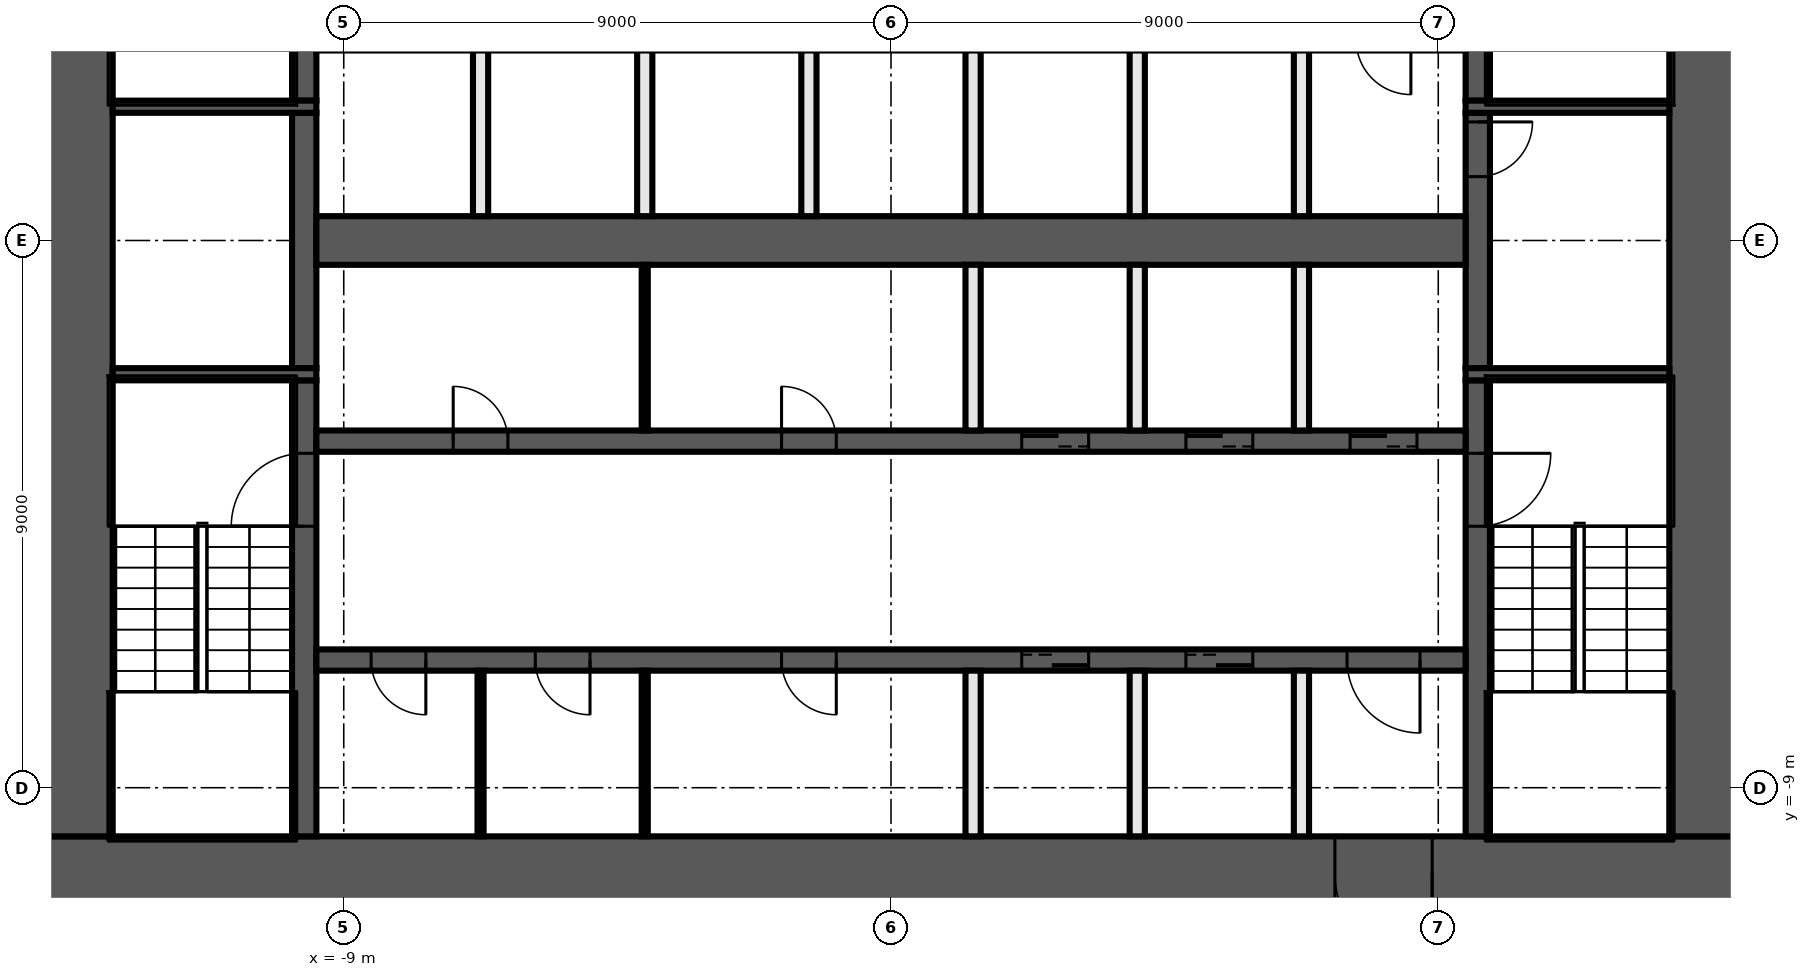
"""IFC4 building model, lengths in metres.
Left out: names, types, materials, properties, quantities, classifications, styles, units other than length and angle.
Written with IfcOpenShell. Run it as: python <this file> out.ifc"""

import sys

from ifc_helpers import new_model, si_unit, direction, frame, frame_2d, origin, place, context, subcontext, project, spatial, rectangle, extrude, element, fill, save


model = new_model("IFC4")
c1 = context("Model", 3, precision=1e-05, world=origin(), true_north=direction((0.0, 1.0)))
c2 = subcontext(c1, "Body", "Model", "MODEL_VIEW")
j1 = project(units=[si_unit("LENGTHUNIT", "METRE"), si_unit("PLANEANGLEUNIT", "RADIAN")], contexts=[c1])
p1 = place(None, origin())
s1 = spatial("IfcSite", under=j1, at=p1, CompositionType="ELEMENT")
p2 = place(p1, origin())
s2 = spatial("IfcBuilding", under=s1, at=p2, CompositionType="ELEMENT")
p3 = place(p2, frame((0.0, 0.0, -6.0)))
s3 = spatial("IfcBuildingStorey", under=s2, at=p3, CompositionType="ELEMENT", Elevation=-6.0)
p4 = place(p3, frame((14.0, -10.4, 0.0), z_axis=(0.0, 0.0, 1.0), x_axis=(-1.0, 0.0, 0.0)))
e1 = element("IfcWall", 1, at=p4, inside=s3, PredefinedType="SHEAR", context=c2, shape_type="SweptSolid", body=[
    extrude(rectangle(XDim=28.0, YDim=1.2, at=frame_2d((14.0, 0.0))), origin(), (0.0, 0.0, 1.0), 5.55),
])
p5 = place(p4, frame((5.1, 0.0, 0.0)))
e2 = element("IfcOpeningElement", 2, at=p5, cuts=e1, PredefinedType="OPENING", context=c2, shape_type="SweptSolid", body=[
    extrude(rectangle(XDim=1.6, YDim=2.1, at=frame_2d((0.8, 1.05))), frame((0.0, 0.61, 0.0), z_axis=(0.0, -1.0, 0.0), x_axis=(1.0, 0.0, 0.0)), (0.0, 0.0, 1.0), 1.22),
])
for number, where, z_axis, x_axis in (
    (3, (13.4, 9.8, 0.0), (0.0, 0.0, 1.0), (0.0, -1.0, 0.0)),
    (4, (-13.4, -9.8, 0.0), (0.0, 0.0, 1.0), (0.0, 1.0, 0.0)),
):
    element("IfcWall", number, at=place(p3, frame(where, z_axis=z_axis, x_axis=x_axis)), inside=s3, PredefinedType="SHEAR", context=c2, shape_type="SweptSolid", body=[
        extrude(rectangle(XDim=19.6, YDim=1.2, at=frame_2d((9.8, 0.0))), origin(), (0.0, 0.0, 1.0), 5.55),
    ])
p6 = place(p3, frame((9.65, -2.3, 0.0), z_axis=(0.0, 0.0, 1.0), x_axis=(0.0, -1.0, 0.0)))
e5 = element("IfcWall", 5, at=p6, inside=s3, PredefinedType="SHEAR", context=c2, shape_type="SweptSolid", body=[
    extrude(rectangle(XDim=7.5, YDim=0.4, at=frame_2d((3.75, 0.0))), origin(), (0.0, 0.0, 1.0), 5.55),
])
p7 = place(p6, frame((1.2, 0.0, 0.0)))
e6 = element("IfcOpeningElement", 6, at=p7, cuts=e5, PredefinedType="OPENING", context=c2, shape_type="SweptSolid", body=[
    extrude(rectangle(XDim=1.2, YDim=2.1, at=frame_2d((0.6, 1.05))), frame((0.0, 0.21, 0.0), z_axis=(0.0, -1.0, 0.0), x_axis=(1.0, 0.0, 0.0)), (0.0, 0.0, 1.0), 0.42),
])
p8 = place(p3, frame((9.65, 2.1, 0.0), z_axis=(0.0, 0.0, 1.0), x_axis=(0.0, -1.0, 0.0)))
e7 = element("IfcWall", 7, at=p8, inside=s3, PredefinedType="SHEAR", context=c2, shape_type="SweptSolid", body=[
    extrude(rectangle(XDim=4.2, YDim=0.4, at=frame_2d((2.1, 0.0))), origin(), (0.0, 0.0, 1.0), 5.55),
])
p9 = place(p8, frame((0.15, 0.0, 0.0)))
e8 = element("IfcOpeningElement", 8, at=p9, cuts=e7, PredefinedType="OPENING", context=c2, shape_type="SweptSolid", body=[
    extrude(rectangle(XDim=0.9, YDim=2.1, at=frame_2d((0.45, 1.05))), frame((0.0, 0.21, 0.0), z_axis=(0.0, -1.0, 0.0), x_axis=(1.0, 0.0, 0.0)), (0.0, 0.0, 1.0), 0.42),
])
p10 = place(p3, frame((9.65, 9.8, 0.0), z_axis=(0.0, 0.0, 1.0), x_axis=(0.0, -1.0, 0.0)))
e9 = element("IfcWall", 9, at=p10, inside=s3, PredefinedType="SHEAR", context=c2, shape_type="SweptSolid", body=[
    extrude(rectangle(XDim=7.5, YDim=0.4, at=frame_2d((3.75, 0.0))), origin(), (0.0, 0.0, 1.0), 5.55),
])
p11 = place(p10, frame((5.1, 0.0, 0.0)))
e10 = element("IfcOpeningElement", 10, at=p11, cuts=e9, PredefinedType="OPENING", context=c2, shape_type="SweptSolid", body=[
    extrude(rectangle(XDim=1.2, YDim=2.1, at=frame_2d((0.6, 1.05))), frame((0.0, 0.21, 0.0), z_axis=(0.0, -1.0, 0.0), x_axis=(1.0, 0.0, 0.0)), (0.0, 0.0, 1.0), 0.42),
])
p12 = place(p3, frame((-9.65, -9.8, 0.0), z_axis=(0.0, 0.0, 1.0), x_axis=(0.0, 1.0, 0.0)))
e11 = element("IfcWall", 11, at=p12, inside=s3, PredefinedType="SHEAR", context=c2, shape_type="SweptSolid", body=[
    extrude(rectangle(XDim=7.5, YDim=0.4, at=frame_2d((3.75, 0.0))), origin(), (0.0, 0.0, 1.0), 5.55),
])
p13 = place(p12, frame((5.1, 0.0, 0.0)))
e12 = element("IfcOpeningElement", 12, at=p13, cuts=e11, PredefinedType="OPENING", context=c2, shape_type="SweptSolid", body=[
    extrude(rectangle(XDim=1.2, YDim=2.1, at=frame_2d((0.6, 1.05))), frame((0.0, 0.21, 0.0), z_axis=(0.0, -1.0, 0.0), x_axis=(1.0, 0.0, 0.0)), (0.0, 0.0, 1.0), 0.42),
])
p14 = place(p3, frame((-9.65, -2.1, 0.0), z_axis=(0.0, 0.0, 1.0), x_axis=(0.0, 1.0, 0.0)))
e13 = element("IfcWall", 13, at=p14, inside=s3, PredefinedType="SHEAR", context=c2, shape_type="SweptSolid", body=[
    extrude(rectangle(XDim=4.2, YDim=0.4, at=frame_2d((2.1, 0.0))), origin(), (0.0, 0.0, 1.0), 5.55),
])
p15 = place(p3, frame((-9.65, 2.3, 0.0), z_axis=(0.0, 0.0, 1.0), x_axis=(0.0, 1.0, 0.0)))
e14 = element("IfcWall", 14, at=p15, inside=s3, PredefinedType="SHEAR", context=c2, shape_type="SweptSolid", body=[
    extrude(rectangle(XDim=7.5, YDim=0.4, at=frame_2d((3.75, 0.0))), origin(), (0.0, 0.0, 1.0), 5.55),
])
p16 = place(p15, frame((1.2, 0.0, 0.0)))
e15 = element("IfcOpeningElement", 15, at=p16, cuts=e14, PredefinedType="OPENING", context=c2, shape_type="SweptSolid", body=[
    extrude(rectangle(XDim=1.2, YDim=2.1, at=frame_2d((0.6, 1.05))), frame((0.0, 0.21, 0.0), z_axis=(0.0, -1.0, 0.0), x_axis=(1.0, 0.0, 0.0)), (0.0, 0.0, 1.0), 0.42),
])
for number, where, z_axis, x_axis in (
    (16, (9.45, 2.2, 0.0), (0.0, 0.0, 1.0), (1.0, 0.0, 0.0)),
    (17, (-9.45, 2.2, 0.0), (0.0, 0.0, 1.0), (-1.0, 0.0, 0.0)),
    (18, (9.45, -2.2, 0.0), (0.0, 0.0, 1.0), (1.0, 0.0, 0.0)),
    (19, (-9.45, -2.2, 0.0), (0.0, 0.0, 1.0), (-1.0, 0.0, 0.0)),
):
    element("IfcWall", number, at=place(p3, frame(where, z_axis=z_axis, x_axis=x_axis)), inside=s3, PredefinedType="SHEAR", context=c2, shape_type="SweptSolid", body=[
        extrude(rectangle(XDim=3.35, YDim=0.2, at=frame_2d((1.675, 0.0))), origin(), (0.0, 0.0, 1.0), 5.55),
    ])
p17 = place(p3, frame((-9.45, -3.3, 0.0), z_axis=(0.0, 0.0, 1.0), x_axis=(1.0, 0.0, 0.0)))
e20 = element("IfcWall", 20, at=p17, inside=s3, PredefinedType="SHEAR", context=c2, shape_type="SweptSolid", body=[
    extrude(rectangle(XDim=18.9, YDim=0.35, at=frame_2d((9.45, 0.0))), origin(), (0.0, 0.0, 1.0), 5.55),
])
p18 = place(p17, frame((11.6, 0.0, 0.0)))
e21 = element("IfcOpeningElement", 21, at=p18, cuts=e20, PredefinedType="OPENING", context=c2, shape_type="SweptSolid", body=[
    extrude(rectangle(XDim=1.1, YDim=2.1, at=frame_2d((0.55, 1.05))), frame((0.0, 0.185, 0.0), z_axis=(0.0, -1.0, 0.0), x_axis=(1.0, 0.0, 0.0)), (0.0, 0.0, 1.0), 0.37),
])
p19 = place(p17, frame((14.3, 0.0, 0.0)))
e22 = element("IfcOpeningElement", 22, at=p19, cuts=e20, PredefinedType="OPENING", context=c2, shape_type="SweptSolid", body=[
    extrude(rectangle(XDim=1.1, YDim=2.1, at=frame_2d((0.55, 1.05))), frame((0.0, 0.185, 0.0), z_axis=(0.0, -1.0, 0.0), x_axis=(1.0, 0.0, 0.0)), (0.0, 0.0, 1.0), 0.37),
])
p20 = place(p17, frame((17.0, 0.0, 0.0)))
e23 = element("IfcOpeningElement", 23, at=p20, cuts=e20, PredefinedType="OPENING", context=c2, shape_type="SweptSolid", body=[
    extrude(rectangle(XDim=1.1, YDim=2.1, at=frame_2d((0.55, 1.05))), frame((0.0, 0.185, 0.0), z_axis=(0.0, -1.0, 0.0), x_axis=(1.0, 0.0, 0.0)), (0.0, 0.0, 1.0), 0.37),
])
p21 = place(p17, frame((2.25, 0.0, 0.0)))
e24 = element("IfcOpeningElement", 24, at=p21, cuts=e20, PredefinedType="OPENING", context=c2, shape_type="SweptSolid", body=[
    extrude(rectangle(XDim=0.9, YDim=2.1, at=frame_2d((0.45, 1.05))), frame((0.0, 0.185, 0.0), z_axis=(0.0, -1.0, 0.0), x_axis=(1.0, 0.0, 0.0)), (0.0, 0.0, 1.0), 0.37),
])
p22 = place(p17, frame((7.65, 0.0, 0.0)))
e25 = element("IfcOpeningElement", 25, at=p22, cuts=e20, PredefinedType="OPENING", context=c2, shape_type="SweptSolid", body=[
    extrude(rectangle(XDim=0.9, YDim=2.1, at=frame_2d((0.45, 1.05))), frame((0.0, 0.185, 0.0), z_axis=(0.0, -1.0, 0.0), x_axis=(1.0, 0.0, 0.0)), (0.0, 0.0, 1.0), 0.37),
])
p23 = place(p3, frame((9.45, -6.9, 0.0), z_axis=(0.0, 0.0, 1.0), x_axis=(-1.0, 0.0, 0.0)))
e26 = element("IfcWall", 26, at=p23, inside=s3, PredefinedType="SHEAR", context=c2, shape_type="SweptSolid", body=[
    extrude(rectangle(XDim=18.9, YDim=0.35, at=frame_2d((9.45, 0.0))), origin(), (0.0, 0.0, 1.0), 5.55),
])
p24 = place(p23, frame((6.2, 0.0, 0.0)))
e27 = element("IfcOpeningElement", 27, at=p24, cuts=e26, PredefinedType="OPENING", context=c2, shape_type="SweptSolid", body=[
    extrude(rectangle(XDim=1.1, YDim=2.1, at=frame_2d((0.55, 1.05))), frame((0.0, 0.185, 0.0), z_axis=(0.0, -1.0, 0.0), x_axis=(1.0, 0.0, 0.0)), (0.0, 0.0, 1.0), 0.37),
])
p25 = place(p23, frame((3.5, 0.0, 0.0)))
e28 = element("IfcOpeningElement", 28, at=p25, cuts=e26, PredefinedType="OPENING", context=c2, shape_type="SweptSolid", body=[
    extrude(rectangle(XDim=1.1, YDim=2.1, at=frame_2d((0.55, 1.05))), frame((0.0, 0.185, 0.0), z_axis=(0.0, -1.0, 0.0), x_axis=(1.0, 0.0, 0.0)), (0.0, 0.0, 1.0), 0.37),
])
p26 = place(p23, frame((0.75, 0.0, 0.0)))
e29 = element("IfcOpeningElement", 29, at=p26, cuts=e26, PredefinedType="OPENING", context=c2, shape_type="SweptSolid", body=[
    extrude(rectangle(XDim=1.2, YDim=2.1, at=frame_2d((0.6, 1.05))), frame((0.0, 0.185, 0.0), z_axis=(0.0, -1.0, 0.0), x_axis=(1.0, 0.0, 0.0)), (0.0, 0.0, 1.0), 0.37),
])
p27 = place(p23, frame((17.1, 0.0, 0.0)))
e30 = element("IfcOpeningElement", 30, at=p27, cuts=e26, PredefinedType="OPENING", context=c2, shape_type="SweptSolid", body=[
    extrude(rectangle(XDim=0.9, YDim=2.1, at=frame_2d((0.45, 1.05))), frame((0.0, 0.185, 0.0), z_axis=(0.0, -1.0, 0.0), x_axis=(1.0, 0.0, 0.0)), (0.0, 0.0, 1.0), 0.37),
])
p28 = place(p23, frame((14.4, 0.0, 0.0)))
e31 = element("IfcOpeningElement", 31, at=p28, cuts=e26, PredefinedType="OPENING", context=c2, shape_type="SweptSolid", body=[
    extrude(rectangle(XDim=0.9, YDim=2.1, at=frame_2d((0.45, 1.05))), frame((0.0, 0.185, 0.0), z_axis=(0.0, -1.0, 0.0), x_axis=(1.0, 0.0, 0.0)), (0.0, 0.0, 1.0), 0.37),
])
p29 = place(p23, frame((10.35, 0.0, 0.0)))
e32 = element("IfcOpeningElement", 32, at=p29, cuts=e26, PredefinedType="OPENING", context=c2, shape_type="SweptSolid", body=[
    extrude(rectangle(XDim=0.9, YDim=2.1, at=frame_2d((0.45, 1.05))), frame((0.0, 0.185, 0.0), z_axis=(0.0, -1.0, 0.0), x_axis=(1.0, 0.0, 0.0)), (0.0, 0.0, 1.0), 0.37),
])
p30 = place(p3, frame((-9.45, 0.0, 0.0), z_axis=(0.0, 0.0, 1.0), x_axis=(1.0, 0.0, 0.0)))
e33 = element("IfcWall", 33, at=p30, inside=s3, PredefinedType="SHEAR", context=c2, shape_type="SweptSolid", body=[
    extrude(rectangle(XDim=18.9, YDim=0.8, at=frame_2d((9.45, 0.0))), origin(), (0.0, 0.0, 1.0), 5.55),
])
for number, where, z_axis, x_axis in (
    (34, (6.75, -9.8, 0.0), (0.0, 0.0, 1.0), (0.0, 1.0, 0.0)),
    (35, (6.75, -3.125, 0.0), (0.0, 0.0, 1.0), (0.0, 1.0, 0.0)),
    (36, (6.75, 0.4, 0.0), (0.0, 0.0, 1.0), (0.0, 1.0, 0.0)),
    (37, (4.05, -9.8, 0.0), (0.0, 0.0, 1.0), (0.0, 1.0, 0.0)),
    (38, (4.05, -3.125, 0.0), (0.0, 0.0, 1.0), (0.0, 1.0, 0.0)),
    (39, (4.05, 0.4, 0.0), (0.0, 0.0, 1.0), (0.0, 1.0, 0.0)),
    (40, (1.35, -9.8, 0.0), (0.0, 0.0, 1.0), (0.0, 1.0, 0.0)),
    (41, (1.35, -3.125, 0.0), (0.0, 0.0, 1.0), (0.0, 1.0, 0.0)),
    (42, (1.35, 0.4, 0.0), (0.0, 0.0, 1.0), (0.0, 1.0, 0.0)),
    (43, (-1.35, 0.4, 0.0), (0.0, 0.0, 1.0), (0.0, 1.0, 0.0)),
):
    element("IfcWall", number, at=place(p3, frame(where, z_axis=z_axis, x_axis=x_axis)), inside=s3, PredefinedType="SOLIDWALL", context=c2, shape_type="SweptSolid", body=[
        extrude(rectangle(XDim=2.725, YDim=0.25, at=frame_2d((1.363, 0.0))), origin(), (0.0, 0.0, 1.0), 5.55),
    ])
for number, where, z_axis, x_axis in (
    (44, (-4.05, -9.8, 0.0), (0.0, 0.0, 1.0), (0.0, 1.0, 0.0)),
    (45, (-4.05, -3.125, 0.0), (0.0, 0.0, 1.0), (0.0, 1.0, 0.0)),
):
    element("IfcWall", number, at=place(p3, frame(where, z_axis=z_axis, x_axis=x_axis)), inside=s3, PredefinedType="PARTITIONING", context=c2, shape_type="SweptSolid", body=[
        extrude(rectangle(XDim=2.725, YDim=0.1, at=frame_2d((1.363, 0.0))), origin(), (0.0, 0.0, 1.0), 5.55),
    ])
p31 = place(p3, frame((-4.05, 0.4, 0.0), z_axis=(0.0, 0.0, 1.0), x_axis=(0.0, 1.0, 0.0)))
e46 = element("IfcWall", 46, at=p31, inside=s3, PredefinedType="SOLIDWALL", context=c2, shape_type="SweptSolid", body=[
    extrude(rectangle(XDim=2.725, YDim=0.25, at=frame_2d((1.363, 0.0))), origin(), (0.0, 0.0, 1.0), 5.55),
])
p32 = place(p3, frame((-6.75, -9.8, 0.0), z_axis=(0.0, 0.0, 1.0), x_axis=(0.0, 1.0, 0.0)))
e47 = element("IfcWall", 47, at=p32, inside=s3, PredefinedType="PARTITIONING", context=c2, shape_type="SweptSolid", body=[
    extrude(rectangle(XDim=2.725, YDim=0.1, at=frame_2d((1.363, 0.0))), origin(), (0.0, 0.0, 1.0), 5.55),
])
p33 = place(p3, frame((-6.75, 0.4, 0.0), z_axis=(0.0, 0.0, 1.0), x_axis=(0.0, 1.0, 0.0)))
e48 = element("IfcWall", 48, at=p33, inside=s3, PredefinedType="SOLIDWALL", context=c2, shape_type="SweptSolid", body=[
    extrude(rectangle(XDim=2.725, YDim=0.25, at=frame_2d((1.363, 0.0))), origin(), (0.0, 0.0, 1.0), 5.55),
])
p34 = place(p9, origin())
e49 = element("IfcDoor", 49, at=p34, inside=s3, OperationType="SINGLE_SWING_RIGHT", PredefinedType="DOOR", context=c2, shape_type="SweptSolid", body=[
    extrude(rectangle(XDim=0.9, YDim=2.1, at=frame_2d((0.45, 1.05))), frame((0.0, 0.025, 0.0), z_axis=(0.0, -1.0, 0.0), x_axis=(1.0, 0.0, 0.0)), (0.0, 0.0, 1.0), 0.05),
])
fill(e8, e49)
p35 = place(p18, origin())
e50 = element("IfcDoor", 50, at=p35, inside=s3, OperationType="DOUBLE_DOOR_SLIDING", PredefinedType="DOOR", context=c2, shape_type="SweptSolid", body=[
    extrude(rectangle(XDim=1.1, YDim=2.1, at=frame_2d((0.55, 1.05))), frame((0.0, 0.025, 0.0), z_axis=(0.0, -1.0, 0.0), x_axis=(1.0, 0.0, 0.0)), (0.0, 0.0, 1.0), 0.05),
])
fill(e21, e50)
p36 = place(p19, origin())
e51 = element("IfcDoor", 51, at=p36, inside=s3, OperationType="DOUBLE_DOOR_SLIDING", PredefinedType="DOOR", context=c2, shape_type="SweptSolid", body=[
    extrude(rectangle(XDim=1.1, YDim=2.1, at=frame_2d((0.55, 1.05))), frame((0.0, 0.025, 0.0), z_axis=(0.0, -1.0, 0.0), x_axis=(1.0, 0.0, 0.0)), (0.0, 0.0, 1.0), 0.05),
])
fill(e22, e51)
p37 = place(p20, origin())
e52 = element("IfcDoor", 52, at=p37, inside=s3, OperationType="DOUBLE_DOOR_SLIDING", PredefinedType="DOOR", context=c2, shape_type="SweptSolid", body=[
    extrude(rectangle(XDim=1.1, YDim=2.1, at=frame_2d((0.55, 1.05))), frame((0.0, 0.025, 0.0), z_axis=(0.0, -1.0, 0.0), x_axis=(1.0, 0.0, 0.0)), (0.0, 0.0, 1.0), 0.05),
])
fill(e23, e52)
p38 = place(p24, origin())
e53 = element("IfcDoor", 53, at=p38, inside=s3, OperationType="DOUBLE_DOOR_SLIDING", PredefinedType="DOOR", context=c2, shape_type="SweptSolid", body=[
    extrude(rectangle(XDim=1.1, YDim=2.1, at=frame_2d((0.55, 1.05))), frame((0.0, 0.025, 0.0), z_axis=(0.0, -1.0, 0.0), x_axis=(1.0, 0.0, 0.0)), (0.0, 0.0, 1.0), 0.05),
])
fill(e27, e53)
p39 = place(p25, origin())
e54 = element("IfcDoor", 54, at=p39, inside=s3, OperationType="DOUBLE_DOOR_SLIDING", PredefinedType="DOOR", context=c2, shape_type="SweptSolid", body=[
    extrude(rectangle(XDim=1.1, YDim=2.1, at=frame_2d((0.55, 1.05))), frame((0.0, 0.025, 0.0), z_axis=(0.0, -1.0, 0.0), x_axis=(1.0, 0.0, 0.0)), (0.0, 0.0, 1.0), 0.05),
])
fill(e28, e54)
p40 = place(p5, origin())
e55 = element("IfcDoor", 55, at=p40, inside=s3, OperationType="DOUBLE_DOOR_SINGLE_SWING", PredefinedType="DOOR", context=c2, shape_type="SweptSolid", body=[
    extrude(rectangle(XDim=1.6, YDim=2.1, at=frame_2d((0.8, 1.05))), frame((0.0, 0.025, 0.0), z_axis=(0.0, -1.0, 0.0), x_axis=(1.0, 0.0, 0.0)), (0.0, 0.0, 1.0), 0.05),
])
fill(e2, e55)
p41 = place(p26, origin())
e56 = element("IfcDoor", 56, at=p41, inside=s3, OperationType="SINGLE_SWING_LEFT", PredefinedType="DOOR", context=c2, shape_type="SweptSolid", body=[
    extrude(rectangle(XDim=1.2, YDim=2.1, at=frame_2d((0.6, 1.05))), frame((0.0, 0.025, 0.0), z_axis=(0.0, -1.0, 0.0), x_axis=(1.0, 0.0, 0.0)), (0.0, 0.0, 1.0), 0.05),
])
fill(e29, e56)
p42 = place(p21, origin())
e57 = element("IfcDoor", 57, at=p42, inside=s3, OperationType="SINGLE_SWING_RIGHT", PredefinedType="DOOR", context=c2, shape_type="SweptSolid", body=[
    extrude(rectangle(XDim=0.9, YDim=2.1, at=frame_2d((0.45, 1.05))), frame((0.0, 0.025, 0.0), z_axis=(0.0, -1.0, 0.0), x_axis=(1.0, 0.0, 0.0)), (0.0, 0.0, 1.0), 0.05),
])
fill(e24, e57)
p43 = place(p22, origin())
e58 = element("IfcDoor", 58, at=p43, inside=s3, OperationType="SINGLE_SWING_LEFT", PredefinedType="DOOR", context=c2, shape_type="SweptSolid", body=[
    extrude(rectangle(XDim=0.9, YDim=2.1, at=frame_2d((0.45, 1.05))), frame((0.0, 0.025, 0.0), z_axis=(0.0, -1.0, 0.0), x_axis=(1.0, 0.0, 0.0)), (0.0, 0.0, 1.0), 0.05),
])
fill(e25, e58)
p44 = place(p27, origin())
e59 = element("IfcDoor", 59, at=p44, inside=s3, OperationType="SINGLE_SWING_RIGHT", PredefinedType="DOOR", context=c2, shape_type="SweptSolid", body=[
    extrude(rectangle(XDim=0.9, YDim=2.1, at=frame_2d((0.45, 1.05))), frame((0.0, 0.025, 0.0), z_axis=(0.0, -1.0, 0.0), x_axis=(1.0, 0.0, 0.0)), (0.0, 0.0, 1.0), 0.05),
])
fill(e30, e59)
p45 = place(p28, origin())
e60 = element("IfcDoor", 60, at=p45, inside=s3, OperationType="SINGLE_SWING_LEFT", PredefinedType="DOOR", context=c2, shape_type="SweptSolid", body=[
    extrude(rectangle(XDim=0.9, YDim=2.1, at=frame_2d((0.45, 1.05))), frame((0.0, 0.025, 0.0), z_axis=(0.0, -1.0, 0.0), x_axis=(1.0, 0.0, 0.0)), (0.0, 0.0, 1.0), 0.05),
])
fill(e31, e60)
p46 = place(p29, origin())
e61 = element("IfcDoor", 61, at=p46, inside=s3, OperationType="SINGLE_SWING_RIGHT", PredefinedType="DOOR", context=c2, shape_type="SweptSolid", body=[
    extrude(rectangle(XDim=0.9, YDim=2.1, at=frame_2d((0.45, 1.05))), frame((0.0, 0.025, 0.0), z_axis=(0.0, -1.0, 0.0), x_axis=(1.0, 0.0, 0.0)), (0.0, 0.0, 1.0), 0.05),
])
fill(e32, e61)
p47 = place(p7, origin())
e62 = element("IfcDoor", 62, at=p47, inside=s3, OperationType="SINGLE_SWING_RIGHT", PredefinedType="DOOR", context=c2, shape_type="SweptSolid", body=[
    extrude(rectangle(XDim=1.2, YDim=2.1, at=frame_2d((0.6, 1.05))), frame((0.0, 0.025, 0.0), z_axis=(0.0, -1.0, 0.0), x_axis=(1.0, 0.0, 0.0)), (0.0, 0.0, 1.0), 0.05),
])
fill(e6, e62)
p48 = place(p13, origin())
e63 = element("IfcDoor", 63, at=p48, inside=s3, OperationType="SINGLE_SWING_LEFT", PredefinedType="DOOR", context=c2, shape_type="SweptSolid", body=[
    extrude(rectangle(XDim=1.2, YDim=2.1, at=frame_2d((0.6, 1.05))), frame((0.0, 0.025, 0.0), z_axis=(0.0, -1.0, 0.0), x_axis=(1.0, 0.0, 0.0)), (0.0, 0.0, 1.0), 0.05),
])
fill(e12, e63)
save(model, sys.argv[1])
